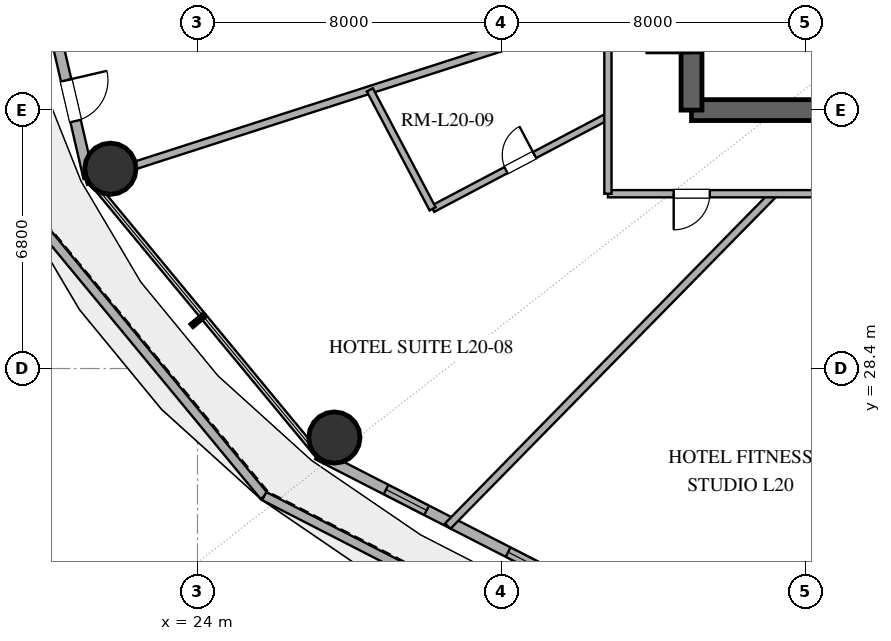
"""IFC4 building model, lengths in metres.
Left out: names, types, materials, properties, quantities, classifications, styles, units other than length and angle.
Written with IfcOpenShell. Run it as: python <this file> out.ifc"""

import sys

from ifc_helpers import new_model, si_unit, direction, frame, frame_2d, origin, origin_2d, place, context, subcontext, project, spatial, rectangle, hollow_circle, extrude, element, fill, save


model = new_model("IFC4")
c1 = context("Model", 3, precision=1e-05, world=origin(), true_north=direction((0.0, 1.0)))
c2 = subcontext(c1, "Body", "Model", "MODEL_VIEW")
j1 = project(units=[si_unit("LENGTHUNIT", "METRE"), si_unit("PLANEANGLEUNIT", "RADIAN")], contexts=[c1])
p1 = place(None, origin())
s1 = spatial("IfcSite", under=j1, at=p1, CompositionType="ELEMENT")
p2 = place(p1, origin())
s2 = spatial("IfcBuilding", under=s1, at=p2, CompositionType="ELEMENT")
p3 = place(p2, frame((0.0, 0.0, 84.0)))
s3 = spatial("IfcBuildingStorey", under=s2, at=p3, CompositionType="ELEMENT", Elevation=84.0)
p4 = place(p3, frame((37.0, 35.2, 0.0), z_axis=(0.0, 0.0, 1.0), x_axis=(1.0, 0.0, 0.0)))
e1 = element("IfcWall", 1, at=p4, inside=s3, PredefinedType="SHEAR", context=c2, shape_type="SweptSolid", body=[
    extrude(rectangle(XDim=4.0, YDim=0.55, at=frame_2d((2.0, 0.0))), origin(), (0.0, 0.0, 1.0), 3.38),
])
p5 = place(p3, frame((37.0, 35.2, 0.0), z_axis=(0.0, 0.0, 1.0), x_axis=(0.0, 1.0, 0.0)))
e2 = element("IfcWall", 2, at=p5, inside=s3, PredefinedType="SHEAR", context=c2, shape_type="SweptSolid", body=[
    extrude(rectangle(XDim=13.6, YDim=0.55, at=frame_2d((6.8, 0.0))), origin(), (0.0, 0.0, 1.0), 3.38),
])
p6 = place(p5, frame((1.5, 0.0, 0.0)))
e3 = element("IfcOpeningElement", 3, at=p6, cuts=e2, PredefinedType="OPENING", context=c2, shape_type="SweptSolid", body=[
    extrude(rectangle(XDim=1.2, YDim=2.15, at=frame_2d((0.6, 1.075))), frame((0.0, 0.285, 0.0), z_axis=(0.0, -1.0, 0.0), x_axis=(1.0, 0.0, 0.0)), (0.0, 0.0, 1.0), 0.57),
])
for number, where, z_axis, x_axis in (
    (4, (21.709, 33.657, 0.0), (0.0, 0.0, 1.0), (1.0, 0.0, 0.0)),
    (5, (27.602, 26.585, 0.0), (0.0, 0.0, 1.0), (1.0, 0.0, 0.0)),
):
    element("IfcColumn", number, at=place(p3, frame(where, z_axis=z_axis, x_axis=x_axis)), inside=s3, PredefinedType="COLUMN", context=c2, shape_type="SweptSolid", body=[
        extrude(hollow_circle(Radius=0.675, WallThickness=0.036, at=origin_2d()), origin(), (0.0, 0.0, 1.0), 3.38),
    ])
p7 = place(p3, frame((19.329, 32.823, 0.0), z_axis=(0.0, 0.0, 1.0), x_axis=(0.636906456166, -0.770941091196, 0.0)))
e6 = element("IfcWall", 6, at=p7, inside=s3, PredefinedType="PARAPET", context=c2, shape_type="SweptSolid", body=[
    extrude(rectangle(XDim=10.091, YDim=0.24, at=frame_2d((5.045, 0.0))), origin(), (0.0, 0.0, 1.0), 1.25),
])
p8 = place(p3, frame((25.756, 25.044, 0.0), z_axis=(0.0, 0.0, 1.0), x_axis=(0.889663800129, -0.456616165658, 0.0)))
e7 = element("IfcWall", 7, at=p8, inside=s3, PredefinedType="PARAPET", context=c2, shape_type="SweptSolid", body=[
    extrude(rectangle(XDim=11.384, YDim=0.24, at=frame_2d((5.692, 0.0))), origin(), (0.0, 0.0, 1.0), 1.25),
])
p9 = place(p3, frame((19.151, 42.0, 0.0), z_axis=(0.0, 0.0, 1.0), x_axis=(0.22558597182, -0.974223264616, 0.0)))
e8 = element("IfcWall", 8, at=p9, inside=s3, PredefinedType="SOLIDWALL", context=c2, shape_type="SweptSolid", body=[
    extrude(rectangle(XDim=8.811, YDim=0.28, at=frame_2d((4.405, 0.0))), origin(), (0.0, 0.0, 1.0), 3.38),
])
p10 = place(p9, frame((6.175, 0.0, 0.0)))
e9 = element("IfcOpeningElement", 9, at=p10, cuts=e8, PredefinedType="OPENING", context=c2, shape_type="SweptSolid", body=[
    extrude(rectangle(XDim=1.1, YDim=2.25, at=frame_2d((0.55, 1.125))), frame((0.0, 0.15, 0.0), z_axis=(0.0, -1.0, 0.0), x_axis=(1.0, 0.0, 0.0)), (0.0, 0.0, 1.0), 0.3),
])
p11 = place(p3, frame((27.16, 26.14, 0.0), z_axis=(0.0, 0.0, 1.0), x_axis=(0.889959505023, -0.45603955905, 0.0)))
e10 = element("IfcWall", 10, at=p11, inside=s3, PredefinedType="SOLIDWALL", context=c2, shape_type="SweptSolid", body=[
    extrude(rectangle(XDim=10.662, YDim=0.28, at=frame_2d((5.331, 0.0))), origin(), (0.0, 0.0, 1.0), 3.38),
])
p12 = place(p11, frame((2.024, 0.0, 0.85)))
e11 = element("IfcOpeningElement", 11, at=p12, cuts=e10, PredefinedType="OPENING", context=c2, shape_type="SweptSolid", body=[
    extrude(rectangle(XDim=1.2, YDim=1.6, at=frame_2d((0.6, 0.8))), frame((0.0, 0.15, 0.0), z_axis=(0.0, -1.0, 0.0), x_axis=(1.0, 0.0, 0.0)), (0.0, 0.0, 1.0), 0.3),
])
p13 = place(p11, frame((5.635, 0.0, 0.85)))
e12 = element("IfcOpeningElement", 12, at=p13, cuts=e10, PredefinedType="OPENING", context=c2, shape_type="SweptSolid", body=[
    extrude(rectangle(XDim=2.1, YDim=2.2, at=frame_2d((1.05, 1.1))), frame((0.0, 0.15, 0.0), z_axis=(0.0, -1.0, 0.0), x_axis=(1.0, 0.0, 0.0)), (0.0, 0.0, 1.0), 0.3),
])
p14 = place(p3, frame((39.167, 33.0, 0.0), z_axis=(0.0, 0.0, 1.0), x_axis=(-0.700440086719, -0.713711205542, 0.0)))
e13 = element("IfcWall", 13, at=p14, inside=s3, PredefinedType="PARTITIONING", context=c2, shape_type="SweptSolid", body=[
    extrude(rectangle(XDim=12.252, YDim=0.2, at=frame_2d((6.126, 0.0))), origin(), (0.0, 0.0, 1.0), 2.74),
])
p15 = place(p3, frame((34.8, 37.75, 0.0), z_axis=(0.0, 0.0, 1.0), x_axis=(-0.951880556228, -0.306469258939, 0.0)))
e14 = element("IfcWall", 14, at=p15, inside=s3, PredefinedType="PARTITIONING", context=c2, shape_type="SweptSolid", body=[
    extrude(rectangle(XDim=14.428, YDim=0.2, at=frame_2d((7.214, 0.0))), origin(), (0.0, 0.0, 1.0), 2.74),
])
p16 = place(p3, frame((46.959, 33.0, 0.0), z_axis=(0.0, 0.0, 1.0), x_axis=(-1.0, 0.0, 0.0)))
e15 = element("IfcWall", 15, at=p16, inside=s3, PredefinedType="PARTITIONING", context=c2, shape_type="SweptSolid", body=[
    extrude(rectangle(XDim=12.159, YDim=0.19, at=frame_2d((6.08, 0.0))), origin(), (0.0, 0.0, 1.0), 2.74),
])
p17 = place(p16, frame((4.237, 0.0, 0.0)))
e16 = element("IfcOpeningElement", 16, at=p17, cuts=e15, PredefinedType="OPENING", context=c2, shape_type="SweptSolid", body=[
    extrude(rectangle(XDim=1.0, YDim=2.2, at=frame_2d((0.5, 1.1))), frame((0.0, 0.105, 0.0), z_axis=(0.0, -1.0, 0.0), x_axis=(1.0, 0.0, 0.0)), (0.0, 0.0, 1.0), 0.21),
])
p18 = place(p16, frame((9.478, 0.0, 0.0)))
e17 = element("IfcOpeningElement", 17, at=p18, cuts=e15, PredefinedType="OPENING", context=c2, shape_type="SweptSolid", body=[
    extrude(rectangle(XDim=0.95, YDim=2.15, at=frame_2d((0.475, 1.075))), frame((0.0, 0.105, 0.0), z_axis=(0.0, -1.0, 0.0), x_axis=(1.0, 0.0, 0.0)), (0.0, 0.0, 1.0), 0.21),
])
p19 = place(p3, frame((30.187, 32.602, 0.0), z_axis=(0.0, 0.0, 1.0), x_axis=(0.884469007168, 0.466598944877, 0.0)))
e18 = element("IfcWall", 18, at=p19, inside=s3, PredefinedType="PLUMBINGWALL", context=c2, shape_type="SweptSolid", body=[
    extrude(rectangle(XDim=5.216, YDim=0.18, at=frame_2d((2.608, 0.0))), origin(), (0.0, 0.0, 1.0), 2.74),
])
p20 = place(p19, frame((2.183, 0.0, 0.0)))
e19 = element("IfcOpeningElement", 19, at=p20, cuts=e18, PredefinedType="OPENING", context=c2, shape_type="SweptSolid", body=[
    extrude(rectangle(XDim=0.85, YDim=2.1, at=frame_2d((0.425, 1.05))), frame((0.0, 0.1, 0.0), z_axis=(0.0, -1.0, 0.0), x_axis=(1.0, 0.0, 0.0)), (0.0, 0.0, 1.0), 0.2),
])
p21 = place(p3, frame((34.8, 33.0, 0.0), z_axis=(0.0, 0.0, 1.0), x_axis=(0.0, 1.0, 0.0)))
e20 = element("IfcWall", 20, at=p21, inside=s3, PredefinedType="PARTITIONING", context=c2, shape_type="SweptSolid", body=[
    extrude(rectangle(XDim=9.004, YDim=0.19, at=frame_2d((4.502, 0.0))), origin(), (0.0, 0.0, 1.0), 2.74),
])
p22 = place(p21, frame((6.385, 0.0, 0.0)))
e21 = element("IfcOpeningElement", 21, at=p22, cuts=e20, PredefinedType="OPENING", context=c2, shape_type="SweptSolid", body=[
    extrude(rectangle(XDim=0.95, YDim=2.15, at=frame_2d((0.475, 1.075))), frame((0.0, 0.105, 0.0), z_axis=(0.0, -1.0, 0.0), x_axis=(1.0, 0.0, 0.0)), (0.0, 0.0, 1.0), 0.21),
])
p23 = place(p3, frame((28.535, 35.733, 0.0), z_axis=(0.0, 0.0, 1.0), x_axis=(0.466638742987, -0.884448010651, 0.0)))
e22 = element("IfcWall", 22, at=p23, inside=s3, PredefinedType="PLUMBINGWALL", context=c2, shape_type="SweptSolid", body=[
    extrude(rectangle(XDim=3.54, YDim=0.18, at=frame_2d((1.77, 0.0))), origin(), (0.0, 0.0, 1.0), 2.74),
])
p24 = place(p10, origin())
e23 = element("IfcDoor", 23, at=p24, inside=s3, OperationType="SINGLE_SWING_LEFT", PredefinedType="DOOR", context=c2, shape_type="SweptSolid", body=[
    extrude(rectangle(XDim=1.1, YDim=2.25, at=frame_2d((0.55, 1.125))), frame((0.0, 0.025, 0.0), z_axis=(0.0, -1.0, 0.0), x_axis=(1.0, 0.0, 0.0)), (0.0, 0.0, 1.0), 0.05),
])
fill(e9, e23)
p25 = place(p12, origin())
e24 = element("IfcWindow", 24, at=p25, inside=s3, PartitioningType="SINGLE_PANEL", PredefinedType="WINDOW", context=c2, shape_type="SweptSolid", body=[
    extrude(rectangle(XDim=1.2, YDim=1.6, at=frame_2d((0.6, 0.8))), frame((0.0, 0.03, 0.0), z_axis=(0.0, -1.0, 0.0), x_axis=(1.0, 0.0, 0.0)), (0.0, 0.0, 1.0), 0.06),
])
fill(e11, e24)
p26 = place(p13, origin())
e25 = element("IfcWindow", 25, at=p26, inside=s3, PartitioningType="SINGLE_PANEL", PredefinedType="WINDOW", context=c2, shape_type="SweptSolid", body=[
    extrude(rectangle(XDim=2.1, YDim=2.2, at=frame_2d((1.05, 1.1))), frame((0.0, 0.03, 0.0), z_axis=(0.0, -1.0, 0.0), x_axis=(1.0, 0.0, 0.0)), (0.0, 0.0, 1.0), 0.06),
])
fill(e12, e25)
p27 = place(p6, origin())
e26 = element("IfcDoor", 26, at=p27, inside=s3, OperationType="SINGLE_SWING_LEFT", PredefinedType="DOOR", context=c2, shape_type="SweptSolid", body=[
    extrude(rectangle(XDim=1.2, YDim=2.15, at=frame_2d((0.6, 1.075))), frame((0.0, 0.025, 0.0), z_axis=(0.0, -1.0, 0.0), x_axis=(1.0, 0.0, 0.0)), (0.0, 0.0, 1.0), 0.05),
])
fill(e3, e26)
p28 = place(p18, origin())
e27 = element("IfcDoor", 27, at=p28, inside=s3, OperationType="SINGLE_SWING_RIGHT", PredefinedType="DOOR", context=c2, shape_type="SweptSolid", body=[
    extrude(rectangle(XDim=0.95, YDim=2.15, at=frame_2d((0.475, 1.075))), frame((0.0, 0.025, 0.0), z_axis=(0.0, -1.0, 0.0), x_axis=(1.0, 0.0, 0.0)), (0.0, 0.0, 1.0), 0.05),
])
fill(e17, e27)
p29 = place(p20, origin())
e28 = element("IfcDoor", 28, at=p29, inside=s3, OperationType="SINGLE_SWING_RIGHT", PredefinedType="DOOR", context=c2, shape_type="SweptSolid", body=[
    extrude(rectangle(XDim=0.85, YDim=2.1, at=frame_2d((0.425, 1.05))), frame((0.0, 0.025, 0.0), z_axis=(0.0, -1.0, 0.0), x_axis=(1.0, 0.0, 0.0)), (0.0, 0.0, 1.0), 0.05),
])
fill(e19, e28)
save(model, sys.argv[1])
